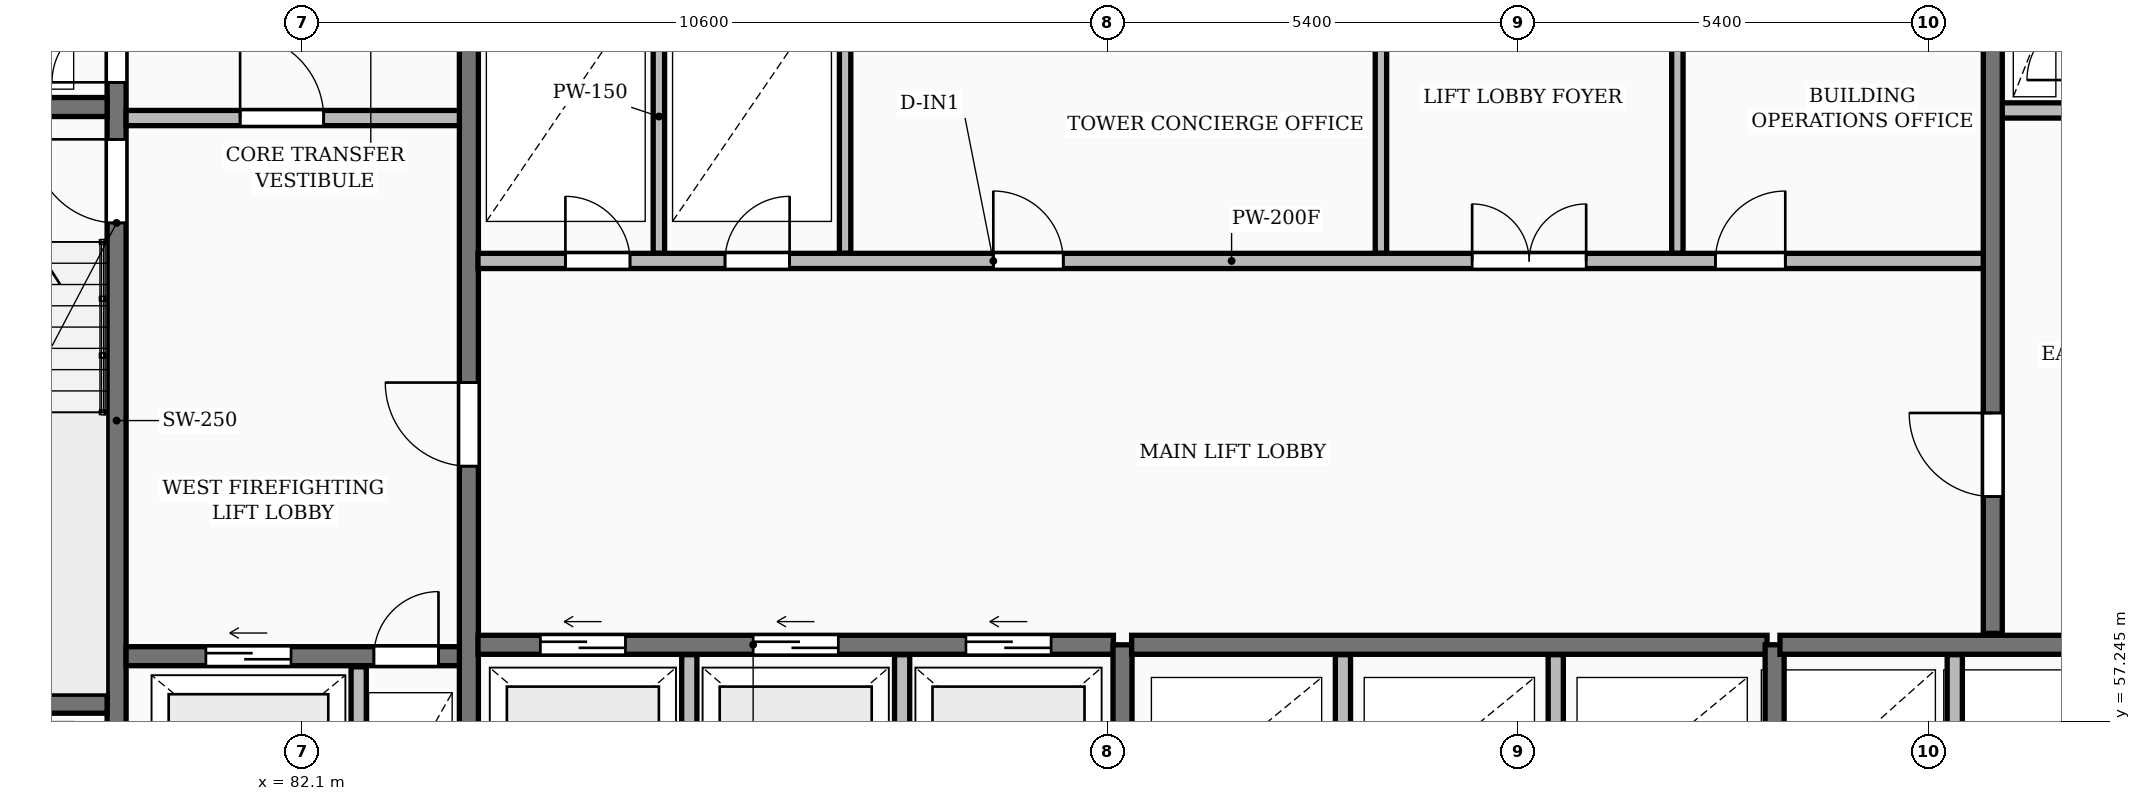
"""IFC4 building model, lengths in metres.
Left out: names, types, materials, properties, quantities, classifications, styles, units other than length and angle.
Written with IfcOpenShell. Run it as: python <this file> out.ifc"""

import sys

from ifc_helpers import new_model, si_unit, direction, frame, frame_2d, origin, place, context, subcontext, project, spatial, rectangle, extrude, element, fill, save


model = new_model("IFC4")
c1 = context("Model", 3, precision=1e-05, world=origin(), true_north=direction((0.0, 1.0)))
c2 = subcontext(c1, "Body", "Model", "MODEL_VIEW")
j1 = project(units=[si_unit("LENGTHUNIT", "METRE"), si_unit("PLANEANGLEUNIT", "RADIAN")], contexts=[c1])
p1 = place(None, origin())
s1 = spatial("IfcSite", under=j1, at=p1, CompositionType="ELEMENT")
p2 = place(p1, origin())
s2 = spatial("IfcBuilding", under=s1, at=p2, CompositionType="ELEMENT")
p3 = place(p2, frame((0.0, 0.0, 87.3)))
s3 = spatial("IfcBuildingStorey", under=s2, at=p3, CompositionType="ELEMENT", Elevation=87.3)
p4 = place(p3, frame((79.665, 55.4, 0.0), z_axis=(0.0, 0.0, 1.0), x_axis=(0.0, 1.0, 0.0)))
e1 = element("IfcWall", 1, at=p4, inside=s3, PredefinedType="SHEAR", context=c2, shape_type="SweptSolid", body=[
    extrude(rectangle(XDim=11.6, YDim=0.25, at=frame_2d((5.8, 0.0))), origin(), (0.0, 0.0, 1.0), 3.25),
])
p5 = place(p4, frame((0.55, 0.0, 0.0)))
e2 = element("IfcOpeningElement", 2, at=p5, cuts=e1, PredefinedType="OPENING", context=c2, shape_type="SweptSolid", body=[
    extrude(rectangle(XDim=0.85, YDim=2.05, at=frame_2d((0.425, 1.025))), frame((0.0, 0.135, 0.0), z_axis=(0.0, -1.0, 0.0), x_axis=(1.0, 0.0, 0.0)), (0.0, 0.0, 1.0), 0.27),
])
p6 = place(p4, frame((8.4, 0.0, 0.0)))
e3 = element("IfcOpeningElement", 3, at=p6, cuts=e1, PredefinedType="OPENING", context=c2, shape_type="SweptSolid", body=[
    extrude(rectangle(XDim=1.1, YDim=2.1, at=frame_2d((0.55, 1.05))), frame((0.0, 0.135, 0.0), z_axis=(0.0, -1.0, 0.0), x_axis=(1.0, 0.0, 0.0)), (0.0, 0.0, 1.0), 0.27),
])
p7 = place(p4, frame((10.25, 0.0, 0.0)))
e4 = element("IfcOpeningElement", 4, at=p7, cuts=e1, PredefinedType="OPENING", context=c2, shape_type="SweptSolid", body=[
    extrude(rectangle(XDim=0.85, YDim=2.05, at=frame_2d((0.425, 1.025))), frame((0.0, 0.135, 0.0), z_axis=(0.0, -1.0, 0.0), x_axis=(1.0, 0.0, 0.0)), (0.0, 0.0, 1.0), 0.27),
])
for number, where, z_axis, x_axis in (
    (5, (76.3, 57.475, 0.0), (0.0, 0.0, 1.0), (1.0, 0.0, 0.0)),
    (6, (76.3, 65.325, 0.0), (0.0, 0.0, 1.0), (1.0, 0.0, 0.0)),
):
    element("IfcWall", number, at=place(p3, frame(where, z_axis=z_axis, x_axis=x_axis)), inside=s3, PredefinedType="SHEAR", context=c2, shape_type="SweptSolid", body=[
        extrude(rectangle(XDim=3.24, YDim=0.25, at=frame_2d((1.62, 0.0))), origin(), (0.0, 0.0, 1.0), 3.25),
    ])
p8 = place(p3, frame((79.79, 58.1, 0.0), z_axis=(0.0, 0.0, 1.0), x_axis=(1.0, 0.0, 0.0)))
e7 = element("IfcWall", 7, at=p8, inside=s3, PredefinedType="SHEAR", context=c2, shape_type="SweptSolid", body=[
    extrude(rectangle(XDim=4.39, YDim=0.25, at=frame_2d((2.195, 0.0))), origin(), (0.0, 0.0, 1.0), 3.25),
])
p9 = place(p8, frame((1.05, 0.0, 0.0)))
e8 = element("IfcOpeningElement", 8, at=p9, cuts=e7, PredefinedType="OPENING", context=c2, shape_type="SweptSolid", body=[
    extrude(rectangle(XDim=1.12, YDim=2.12, at=frame_2d((0.56, 1.06))), frame((0.0, 0.135, 0.0), z_axis=(0.0, -1.0, 0.0), x_axis=(1.0, 0.0, 0.0)), (0.0, 0.0, 1.0), 0.27),
])
p10 = place(p8, frame((3.26, 0.0, 0.0)))
e9 = element("IfcOpeningElement", 9, at=p10, cuts=e7, PredefinedType="OPENING", context=c2, shape_type="SweptSolid", body=[
    extrude(rectangle(XDim=0.85, YDim=2.05, at=frame_2d((0.425, 1.025))), frame((0.0, 0.135, 0.0), z_axis=(0.0, -1.0, 0.0), x_axis=(1.0, 0.0, 0.0)), (0.0, 0.0, 1.0), 0.27),
])
p11 = place(p3, frame((82.85, 55.4, 0.0), z_axis=(0.0, 0.0, 1.0), x_axis=(0.0, 1.0, 0.0)))
e10 = element("IfcWall", 10, at=p11, inside=s3, PredefinedType="PARTITIONING", context=c2, shape_type="SweptSolid", body=[
    extrude(rectangle(XDim=2.56, YDim=0.2, at=frame_2d((1.28, 0.0))), origin(), (0.0, 0.0, 1.0), 2.97),
])
p12 = place(p3, frame((79.79, 65.18, 0.0), z_axis=(0.0, 0.0, 1.0), x_axis=(1.0, 0.0, 0.0)))
e11 = element("IfcWall", 11, at=p12, inside=s3, PredefinedType="PARTITIONING", context=c2, shape_type="SweptSolid", body=[
    extrude(rectangle(XDim=4.39, YDim=0.2, at=frame_2d((2.195, 0.0))), origin(), (0.0, 0.0, 1.0), 2.97),
])
p13 = place(p12, frame((1.5, 0.0, 0.0)))
e12 = element("IfcOpeningElement", 12, at=p13, cuts=e11, PredefinedType="OPENING", context=c2, shape_type="SweptSolid", body=[
    extrude(rectangle(XDim=1.1, YDim=2.1, at=frame_2d((0.55, 1.05))), frame((0.0, 0.11, 0.0), z_axis=(0.0, -1.0, 0.0), x_axis=(1.0, 0.0, 0.0)), (0.0, 0.0, 1.0), 0.22),
])
p14 = place(p3, frame((84.3, 55.4, 0.0), z_axis=(0.0, 0.0, 1.0), x_axis=(0.0, 1.0, 0.0)))
e13 = element("IfcWall", 13, at=p14, inside=s3, PredefinedType="SHEAR", context=c2, shape_type="SweptSolid", body=[
    extrude(rectangle(XDim=11.6, YDim=0.25, at=frame_2d((5.8, 0.0))), origin(), (0.0, 0.0, 1.0), 3.25),
])
p15 = place(p14, frame((5.2, 0.0, 0.0)))
e14 = element("IfcOpeningElement", 14, at=p15, cuts=e13, PredefinedType="OPENING", context=c2, shape_type="SweptSolid", body=[
    extrude(rectangle(XDim=1.1, YDim=2.1, at=frame_2d((0.55, 1.05))), frame((0.0, 0.135, 0.0), z_axis=(0.0, -1.0, 0.0), x_axis=(1.0, 0.0, 0.0)), (0.0, 0.0, 1.0), 0.27),
])
for number, where, z_axis, x_axis in (
    (15, (87.2, 55.4, 0.0), (0.0, 0.0, 1.0), (0.0, 1.0, 0.0)),
    (16, (90.0, 55.4, 0.0), (0.0, 0.0, 1.0), (0.0, 1.0, 0.0)),
):
    element("IfcWall", number, at=place(p3, frame(where, z_axis=z_axis, x_axis=x_axis)), inside=s3, PredefinedType="PARTITIONING", context=c2, shape_type="SweptSolid", body=[
        extrude(rectangle(XDim=2.72, YDim=0.2, at=frame_2d((1.36, 0.0))), origin(), (0.0, 0.0, 1.0), 2.97),
    ])
p16 = place(p3, frame((84.42, 58.25, 0.0), z_axis=(0.0, 0.0, 1.0), x_axis=(1.0, 0.0, 0.0)))
e17 = element("IfcWall", 17, at=p16, inside=s3, PredefinedType="SHEAR", context=c2, shape_type="SweptSolid", body=[
    extrude(rectangle(XDim=8.36, YDim=0.25, at=frame_2d((4.18, 0.0))), origin(), (0.0, 0.0, 1.0), 3.25),
])
p17 = place(p16, frame((0.82, 0.0, 0.0)))
e18 = element("IfcOpeningElement", 18, at=p17, cuts=e17, PredefinedType="OPENING", context=c2, shape_type="SweptSolid", body=[
    extrude(rectangle(XDim=1.12, YDim=2.12, at=frame_2d((0.56, 1.06))), frame((0.0, 0.135, 0.0), z_axis=(0.0, -1.0, 0.0), x_axis=(1.0, 0.0, 0.0)), (0.0, 0.0, 1.0), 0.27),
])
p18 = place(p16, frame((3.62, 0.0, 0.0)))
e19 = element("IfcOpeningElement", 19, at=p18, cuts=e17, PredefinedType="OPENING", context=c2, shape_type="SweptSolid", body=[
    extrude(rectangle(XDim=1.12, YDim=2.12, at=frame_2d((0.56, 1.06))), frame((0.0, 0.135, 0.0), z_axis=(0.0, -1.0, 0.0), x_axis=(1.0, 0.0, 0.0)), (0.0, 0.0, 1.0), 0.27),
])
p19 = place(p16, frame((6.42, 0.0, 0.0)))
e20 = element("IfcOpeningElement", 20, at=p19, cuts=e17, PredefinedType="OPENING", context=c2, shape_type="SweptSolid", body=[
    extrude(rectangle(XDim=1.12, YDim=2.12, at=frame_2d((0.56, 1.06))), frame((0.0, 0.135, 0.0), z_axis=(0.0, -1.0, 0.0), x_axis=(1.0, 0.0, 0.0)), (0.0, 0.0, 1.0), 0.27),
])
p20 = place(p3, frame((92.9, 55.4, 0.0), z_axis=(0.0, 0.0, 1.0), x_axis=(0.0, 1.0, 0.0)))
e21 = element("IfcWall", 21, at=p20, inside=s3, PredefinedType="SHEAR", context=c2, shape_type="SweptSolid", body=[
    extrude(rectangle(XDim=2.85, YDim=0.25, at=frame_2d((1.425, 0.0))), origin(), (0.0, 0.0, 1.0), 3.25),
])
for number, where, z_axis, x_axis in (
    (22, (95.8, 55.4, 0.0), (0.0, 0.0, 1.0), (0.0, 1.0, 0.0)),
    (23, (98.6, 55.4, 0.0), (0.0, 0.0, 1.0), (0.0, 1.0, 0.0)),
):
    element("IfcWall", number, at=place(p3, frame(where, z_axis=z_axis, x_axis=x_axis)), inside=s3, PredefinedType="PARTITIONING", context=c2, shape_type="SweptSolid", body=[
        extrude(rectangle(XDim=2.72, YDim=0.2, at=frame_2d((1.36, 0.0))), origin(), (0.0, 0.0, 1.0), 2.97),
    ])
p21 = place(p3, frame((93.02, 58.25, 0.0), z_axis=(0.0, 0.0, 1.0), x_axis=(1.0, 0.0, 0.0)))
e24 = element("IfcWall", 24, at=p21, inside=s3, PredefinedType="SHEAR", context=c2, shape_type="SweptSolid", body=[
    extrude(rectangle(XDim=8.36, YDim=0.25, at=frame_2d((4.18, 0.0))), origin(), (0.0, 0.0, 1.0), 3.25),
])
p22 = place(p3, frame((101.48, 55.4, 0.0), z_axis=(0.0, 0.0, 1.0), x_axis=(0.0, 1.0, 0.0)))
e25 = element("IfcWall", 25, at=p22, inside=s3, PredefinedType="SHEAR", context=c2, shape_type="SweptSolid", body=[
    extrude(rectangle(XDim=2.85, YDim=0.25, at=frame_2d((1.425, 0.0))), origin(), (0.0, 0.0, 1.0), 3.25),
])
p23 = place(p3, frame((103.85, 55.4, 0.0), z_axis=(0.0, 0.0, 1.0), x_axis=(0.0, 1.0, 0.0)))
e26 = element("IfcWall", 26, at=p23, inside=s3, PredefinedType="PARTITIONING", context=c2, shape_type="SweptSolid", body=[
    extrude(rectangle(XDim=2.72, YDim=0.2, at=frame_2d((1.36, 0.0))), origin(), (0.0, 0.0, 1.0), 2.97),
])
p24 = place(p3, frame((101.55, 58.25, 0.0), z_axis=(0.0, 0.0, 1.0), x_axis=(1.0, 0.0, 0.0)))
e27 = element("IfcWall", 27, at=p24, inside=s3, PredefinedType="SHEAR", context=c2, shape_type="SweptSolid", body=[
    extrude(rectangle(XDim=4.6, YDim=0.25, at=frame_2d((2.3, 0.0))), origin(), (0.0, 0.0, 1.0), 3.25),
])
for number, where, z_axis, x_axis in (
    (28, (86.8, 63.4, 0.0), (0.0, 0.0, 1.0), (0.0, 1.0, 0.0)),
    (29, (89.25, 63.4, 0.0), (0.0, 0.0, 1.0), (0.0, 1.0, 0.0)),
    (30, (96.3, 63.4, 0.0), (0.0, 0.0, 1.0), (0.0, 1.0, 0.0)),
    (31, (100.2, 63.4, 0.0), (0.0, 0.0, 1.0), (0.0, 1.0, 0.0)),
):
    element("IfcWall", number, at=place(p3, frame(where, z_axis=z_axis, x_axis=x_axis)), inside=s3, PredefinedType="PARTITIONING", context=c2, shape_type="SweptSolid", body=[
        extrude(rectangle(XDim=3.6, YDim=0.15, at=frame_2d((1.8, 0.0))), origin(), (0.0, 0.0, 1.0), 2.97),
    ])
p25 = place(p3, frame((84.42, 63.3, 0.0), z_axis=(0.0, 0.0, 1.0), x_axis=(1.0, 0.0, 0.0)))
e32 = element("IfcWall", 32, at=p25, inside=s3, PredefinedType="PARTITIONING", context=c2, shape_type="SweptSolid", body=[
    extrude(rectangle(XDim=19.83, YDim=0.2, at=frame_2d((9.915, 0.0))), origin(), (0.0, 0.0, 1.0), 2.97),
])
p26 = place(p25, frame((1.15, 0.0, 0.0)))
e33 = element("IfcOpeningElement", 33, at=p26, cuts=e32, PredefinedType="OPENING", context=c2, shape_type="SweptSolid", body=[
    extrude(rectangle(XDim=0.85, YDim=2.05, at=frame_2d((0.425, 1.025))), frame((0.0, 0.11, 0.0), z_axis=(0.0, -1.0, 0.0), x_axis=(1.0, 0.0, 0.0)), (0.0, 0.0, 1.0), 0.22),
])
p27 = place(p25, frame((3.25, 0.0, 0.0)))
e34 = element("IfcOpeningElement", 34, at=p27, cuts=e32, PredefinedType="OPENING", context=c2, shape_type="SweptSolid", body=[
    extrude(rectangle(XDim=0.85, YDim=2.05, at=frame_2d((0.425, 1.025))), frame((0.0, 0.11, 0.0), z_axis=(0.0, -1.0, 0.0), x_axis=(1.0, 0.0, 0.0)), (0.0, 0.0, 1.0), 0.22),
])
p28 = place(p25, frame((13.08, 0.0, 0.0)))
e35 = element("IfcOpeningElement", 35, at=p28, cuts=e32, PredefinedType="OPENING", context=c2, shape_type="SweptSolid", body=[
    extrude(rectangle(XDim=1.5, YDim=2.2, at=frame_2d((0.75, 1.1))), frame((0.0, 0.11, 0.0), z_axis=(0.0, -1.0, 0.0), x_axis=(1.0, 0.0, 0.0)), (0.0, 0.0, 1.0), 0.22),
])
p29 = place(p25, frame((6.78, 0.0, 0.0)))
e36 = element("IfcOpeningElement", 36, at=p29, cuts=e32, PredefinedType="OPENING", context=c2, shape_type="SweptSolid", body=[
    extrude(rectangle(XDim=0.92, YDim=2.08, at=frame_2d((0.46, 1.04))), frame((0.0, 0.11, 0.0), z_axis=(0.0, -1.0, 0.0), x_axis=(1.0, 0.0, 0.0)), (0.0, 0.0, 1.0), 0.22),
])
p30 = place(p25, frame((16.28, 0.0, 0.0)))
e37 = element("IfcOpeningElement", 37, at=p30, cuts=e32, PredefinedType="OPENING", context=c2, shape_type="SweptSolid", body=[
    extrude(rectangle(XDim=0.92, YDim=2.08, at=frame_2d((0.46, 1.04))), frame((0.0, 0.11, 0.0), z_axis=(0.0, -1.0, 0.0), x_axis=(1.0, 0.0, 0.0)), (0.0, 0.0, 1.0), 0.22),
])
p31 = place(p3, frame((104.45, 65.28, 0.0), z_axis=(0.0, 0.0, 1.0), x_axis=(1.0, 0.0, 0.0)))
e38 = element("IfcWall", 38, at=p31, inside=s3, PredefinedType="PARTITIONING", context=c2, shape_type="SweptSolid", body=[
    extrude(rectangle(XDim=1.2, YDim=0.2, at=frame_2d((0.6, 0.0))), origin(), (0.0, 0.0, 1.0), 2.97),
])
p32 = place(p3, frame((104.35, 58.4, 0.0), z_axis=(0.0, 0.0, 1.0), x_axis=(0.0, 1.0, 0.0)))
e39 = element("IfcWall", 39, at=p32, inside=s3, PredefinedType="SHEAR", context=c2, shape_type="SweptSolid", body=[
    extrude(rectangle(XDim=8.6, YDim=0.25, at=frame_2d((4.3, 0.0))), origin(), (0.0, 0.0, 1.0), 3.25),
])
p33 = place(p32, frame((1.8, 0.0, 0.0)))
e40 = element("IfcOpeningElement", 40, at=p33, cuts=e39, PredefinedType="OPENING", context=c2, shape_type="SweptSolid", body=[
    extrude(rectangle(XDim=1.1, YDim=2.1, at=frame_2d((0.55, 1.05))), frame((0.0, 0.135, 0.0), z_axis=(0.0, -1.0, 0.0), x_axis=(1.0, 0.0, 0.0)), (0.0, 0.0, 1.0), 0.27),
])
p34 = place(p6, origin())
e41 = element("IfcDoor", 41, at=p34, inside=s3, OperationType="SINGLE_SWING_RIGHT", PredefinedType="DOOR", context=c2, shape_type="SweptSolid", body=[
    extrude(rectangle(XDim=1.1, YDim=2.1, at=frame_2d((0.55, 1.05))), frame((0.0, 0.025, 0.0), z_axis=(0.0, -1.0, 0.0), x_axis=(1.0, 0.0, 0.0)), (0.0, 0.0, 1.0), 0.05),
])
fill(e3, e41)
p35 = place(p7, origin())
e42 = element("IfcDoor", 42, at=p35, inside=s3, OperationType="SINGLE_SWING_LEFT", PredefinedType="DOOR", context=c2, shape_type="SweptSolid", body=[
    extrude(rectangle(XDim=0.85, YDim=2.05, at=frame_2d((0.425, 1.025))), frame((0.0, 0.025, 0.0), z_axis=(0.0, -1.0, 0.0), x_axis=(1.0, 0.0, 0.0)), (0.0, 0.0, 1.0), 0.05),
])
fill(e4, e42)
p36 = place(p9, origin())
e43 = element("IfcDoor", 43, at=p36, inside=s3, OperationType="SLIDING_TO_LEFT", PredefinedType="DOOR", context=c2, shape_type="SweptSolid", body=[
    extrude(rectangle(XDim=1.12, YDim=2.12, at=frame_2d((0.56, 1.06))), frame((0.0, 0.025, 0.0), z_axis=(0.0, -1.0, 0.0), x_axis=(1.0, 0.0, 0.0)), (0.0, 0.0, 1.0), 0.05),
])
fill(e8, e43)
p37 = place(p10, origin())
e44 = element("IfcDoor", 44, at=p37, inside=s3, OperationType="SINGLE_SWING_RIGHT", PredefinedType="DOOR", context=c2, shape_type="SweptSolid", body=[
    extrude(rectangle(XDim=0.85, YDim=2.05, at=frame_2d((0.425, 1.025))), frame((0.0, 0.025, 0.0), z_axis=(0.0, -1.0, 0.0), x_axis=(1.0, 0.0, 0.0)), (0.0, 0.0, 1.0), 0.05),
])
fill(e9, e44)
p38 = place(p13, origin())
e45 = element("IfcDoor", 45, at=p38, inside=s3, OperationType="SINGLE_SWING_LEFT", PredefinedType="DOOR", context=c2, shape_type="SweptSolid", body=[
    extrude(rectangle(XDim=1.1, YDim=2.1, at=frame_2d((0.55, 1.05))), frame((0.0, 0.025, 0.0), z_axis=(0.0, -1.0, 0.0), x_axis=(1.0, 0.0, 0.0)), (0.0, 0.0, 1.0), 0.05),
])
fill(e12, e45)
p39 = place(p15, origin())
e46 = element("IfcDoor", 46, at=p39, inside=s3, OperationType="SINGLE_SWING_RIGHT", PredefinedType="DOOR", context=c2, shape_type="SweptSolid", body=[
    extrude(rectangle(XDim=1.1, YDim=2.1, at=frame_2d((0.55, 1.05))), frame((0.0, 0.025, 0.0), z_axis=(0.0, -1.0, 0.0), x_axis=(1.0, 0.0, 0.0)), (0.0, 0.0, 1.0), 0.05),
])
fill(e14, e46)
p40 = place(p17, origin())
e47 = element("IfcDoor", 47, at=p40, inside=s3, OperationType="SLIDING_TO_LEFT", PredefinedType="DOOR", context=c2, shape_type="SweptSolid", body=[
    extrude(rectangle(XDim=1.12, YDim=2.12, at=frame_2d((0.56, 1.06))), frame((0.0, 0.025, 0.0), z_axis=(0.0, -1.0, 0.0), x_axis=(1.0, 0.0, 0.0)), (0.0, 0.0, 1.0), 0.05),
])
fill(e18, e47)
p41 = place(p18, origin())
e48 = element("IfcDoor", 48, at=p41, inside=s3, OperationType="SLIDING_TO_LEFT", PredefinedType="DOOR", context=c2, shape_type="SweptSolid", body=[
    extrude(rectangle(XDim=1.12, YDim=2.12, at=frame_2d((0.56, 1.06))), frame((0.0, 0.025, 0.0), z_axis=(0.0, -1.0, 0.0), x_axis=(1.0, 0.0, 0.0)), (0.0, 0.0, 1.0), 0.05),
])
fill(e19, e48)
p42 = place(p19, origin())
e49 = element("IfcDoor", 49, at=p42, inside=s3, OperationType="SLIDING_TO_LEFT", PredefinedType="DOOR", context=c2, shape_type="SweptSolid", body=[
    extrude(rectangle(XDim=1.12, YDim=2.12, at=frame_2d((0.56, 1.06))), frame((0.0, 0.025, 0.0), z_axis=(0.0, -1.0, 0.0), x_axis=(1.0, 0.0, 0.0)), (0.0, 0.0, 1.0), 0.05),
])
fill(e20, e49)
p43 = place(p26, origin())
e50 = element("IfcDoor", 50, at=p43, inside=s3, OperationType="SINGLE_SWING_LEFT", PredefinedType="DOOR", context=c2, shape_type="SweptSolid", body=[
    extrude(rectangle(XDim=0.85, YDim=2.05, at=frame_2d((0.425, 1.025))), frame((0.0, 0.025, 0.0), z_axis=(0.0, -1.0, 0.0), x_axis=(1.0, 0.0, 0.0)), (0.0, 0.0, 1.0), 0.05),
])
fill(e33, e50)
p44 = place(p27, origin())
e51 = element("IfcDoor", 51, at=p44, inside=s3, OperationType="SINGLE_SWING_RIGHT", PredefinedType="DOOR", context=c2, shape_type="SweptSolid", body=[
    extrude(rectangle(XDim=0.85, YDim=2.05, at=frame_2d((0.425, 1.025))), frame((0.0, 0.025, 0.0), z_axis=(0.0, -1.0, 0.0), x_axis=(1.0, 0.0, 0.0)), (0.0, 0.0, 1.0), 0.05),
])
fill(e34, e51)
p45 = place(p28, origin())
e52 = element("IfcDoor", 52, at=p45, inside=s3, OperationType="DOUBLE_DOOR_SINGLE_SWING", PredefinedType="DOOR", context=c2, shape_type="SweptSolid", body=[
    extrude(rectangle(XDim=1.5, YDim=2.2, at=frame_2d((0.75, 1.1))), frame((0.0, 0.025, 0.0), z_axis=(0.0, -1.0, 0.0), x_axis=(1.0, 0.0, 0.0)), (0.0, 0.0, 1.0), 0.05),
])
fill(e35, e52)
p46 = place(p29, origin())
e53 = element("IfcDoor", 53, at=p46, inside=s3, OperationType="SINGLE_SWING_LEFT", PredefinedType="DOOR", context=c2, shape_type="SweptSolid", body=[
    extrude(rectangle(XDim=0.92, YDim=2.08, at=frame_2d((0.46, 1.04))), frame((0.0, 0.025, 0.0), z_axis=(0.0, -1.0, 0.0), x_axis=(1.0, 0.0, 0.0)), (0.0, 0.0, 1.0), 0.05),
])
fill(e36, e53)
p47 = place(p30, origin())
e54 = element("IfcDoor", 54, at=p47, inside=s3, OperationType="SINGLE_SWING_RIGHT", PredefinedType="DOOR", context=c2, shape_type="SweptSolid", body=[
    extrude(rectangle(XDim=0.92, YDim=2.08, at=frame_2d((0.46, 1.04))), frame((0.0, 0.025, 0.0), z_axis=(0.0, -1.0, 0.0), x_axis=(1.0, 0.0, 0.0)), (0.0, 0.0, 1.0), 0.05),
])
fill(e37, e54)
p48 = place(p33, origin())
e55 = element("IfcDoor", 55, at=p48, inside=s3, OperationType="SINGLE_SWING_RIGHT", PredefinedType="DOOR", context=c2, shape_type="SweptSolid", body=[
    extrude(rectangle(XDim=1.1, YDim=2.1, at=frame_2d((0.55, 1.05))), frame((0.0, 0.025, 0.0), z_axis=(0.0, -1.0, 0.0), x_axis=(1.0, 0.0, 0.0)), (0.0, 0.0, 1.0), 0.05),
])
fill(e40, e55)
save(model, sys.argv[1])
